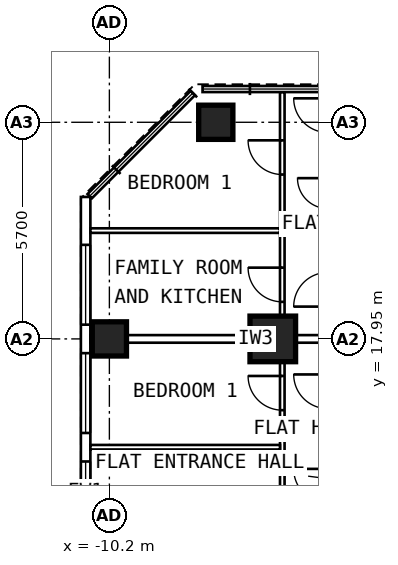
"""IFC4 building model, lengths in metres.
Left out: names, types, materials, properties, quantities, classifications, styles, units other than length and angle.
Written with IfcOpenShell. Run it as: python <this file> out.ifc"""

import sys

from ifc_helpers import new_model, si_unit, direction, frame, frame_2d, origin, origin_2d, place, context, subcontext, project, spatial, rectangle, extrude, element, fill, save


model = new_model("IFC4")
c1 = context("Model", 3, precision=1e-05, world=origin(), true_north=direction((0.0, 1.0)))
c2 = subcontext(c1, "Body", "Model", "MODEL_VIEW")
j1 = project(units=[si_unit("LENGTHUNIT", "METRE"), si_unit("PLANEANGLEUNIT", "RADIAN")], contexts=[c1])
p1 = place(None, origin())
s1 = spatial("IfcSite", under=j1, at=p1, CompositionType="ELEMENT")
p2 = place(p1, origin())
s2 = spatial("IfcBuilding", under=s1, at=p2, CompositionType="ELEMENT")
p3 = place(p2, frame((0.0, 0.0, 141.8)))
s3 = spatial("IfcBuildingStorey", under=s2, at=p3, CompositionType="ELEMENT", Elevation=141.8)
for number, where, z_axis, x_axis in (
    (1, (-10.2, 17.95, 0.0), (0.0, 0.0, 1.0), (0.0, 1.0, 0.0)),
    (2, (-7.4, 23.65, 0.0), (0.0, 0.0, 1.0), (0.0, 1.0, 0.0)),
):
    element("IfcColumn", number, at=place(p3, frame(where, z_axis=z_axis, x_axis=x_axis)), inside=s3, PredefinedType="COLUMN", context=c2, shape_type="SweptSolid", body=[
        extrude(rectangle(XDim=0.9, YDim=0.9, at=origin_2d()), origin(), (0.0, 0.0, 1.0), 3.6),
    ])
p4 = place(p3, frame((-5.9, 17.95, 0.0), z_axis=(0.0, 0.0, 1.0), x_axis=(0.0, 1.0, 0.0)))
e3 = element("IfcColumn", 3, at=p4, inside=s3, PredefinedType="COLUMN", context=c2, shape_type="SweptSolid", body=[
    extrude(rectangle(XDim=1.2, YDim=1.2, at=origin_2d()), origin(), (0.0, 0.0, 1.0), 3.6),
])
p5 = place(p3, frame((-10.825, 6.148, 0.0), z_axis=(0.0, 0.0, 1.0), x_axis=(0.0, 1.0, 0.0)))
e4 = element("IfcWall", 4, at=p5, inside=s3, PredefinedType="SOLIDWALL", context=c2, shape_type="SweptSolid", body=[
    extrude(rectangle(XDim=15.537, YDim=0.25, at=frame_2d((7.769, 0.0))), origin(), (0.0, 0.0, 1.0), 3.35),
])
p6 = place(p5, frame((0.777, 0.0, 0.8)))
e5 = element("IfcOpeningElement", 5, at=p6, cuts=e4, PredefinedType="OPENING", context=c2, shape_type="SweptSolid", body=[
    extrude(rectangle(XDim=2.1, YDim=1.8, at=frame_2d((1.05, 0.9))), frame((0.0, 0.137, 0.0), z_axis=(0.0, -1.0, 0.0), x_axis=(1.0, 0.0, 0.0)), (0.0, 0.0, 1.0), 0.274),
])
p7 = place(p5, frame((3.627, 0.0, 0.8)))
e6 = element("IfcOpeningElement", 6, at=p7, cuts=e4, PredefinedType="OPENING", context=c2, shape_type="SweptSolid", body=[
    extrude(rectangle(XDim=2.1, YDim=1.8, at=frame_2d((1.05, 0.9))), frame((0.0, 0.137, 0.0), z_axis=(0.0, -1.0, 0.0), x_axis=(1.0, 0.0, 0.0)), (0.0, 0.0, 1.0), 0.274),
])
p8 = place(p5, frame((6.477, 0.0, 0.8)))
e7 = element("IfcOpeningElement", 7, at=p8, cuts=e4, PredefinedType="OPENING", context=c2, shape_type="SweptSolid", body=[
    extrude(rectangle(XDim=2.1, YDim=1.8, at=frame_2d((1.05, 0.9))), frame((0.0, 0.137, 0.0), z_axis=(0.0, -1.0, 0.0), x_axis=(1.0, 0.0, 0.0)), (0.0, 0.0, 1.0), 0.274),
])
p9 = place(p5, frame((9.327, 0.0, 0.8)))
e8 = element("IfcOpeningElement", 8, at=p9, cuts=e4, PredefinedType="OPENING", context=c2, shape_type="SweptSolid", body=[
    extrude(rectangle(XDim=2.1, YDim=1.8, at=frame_2d((1.05, 0.9))), frame((0.0, 0.137, 0.0), z_axis=(0.0, -1.0, 0.0), x_axis=(1.0, 0.0, 0.0)), (0.0, 0.0, 1.0), 0.274),
])
p10 = place(p5, frame((12.177, 0.0, 0.8)))
e9 = element("IfcOpeningElement", 9, at=p10, cuts=e4, PredefinedType="OPENING", context=c2, shape_type="SweptSolid", body=[
    extrude(rectangle(XDim=2.1, YDim=1.8, at=frame_2d((1.05, 0.9))), frame((0.0, 0.137, 0.0), z_axis=(0.0, -1.0, 0.0), x_axis=(1.0, 0.0, 0.0)), (0.0, 0.0, 1.0), 0.274),
])
p11 = place(p3, frame((-5.65, 9.6, 0.0), z_axis=(0.0, 0.0, 1.0), x_axis=(0.0, 1.0, 0.0)))
e10 = element("IfcWall", 10, at=p11, inside=s3, PredefinedType="PARTITIONING", context=c2, shape_type="SweptSolid", body=[
    extrude(rectangle(XDim=8.1, YDim=0.12, at=frame_2d((4.05, 0.0))), origin(), (0.0, 0.0, 1.0), 3.35),
])
p12 = place(p11, frame((3.4, 0.0, 0.0)))
e11 = element("IfcOpeningElement", 11, at=p12, cuts=e10, PredefinedType="OPENING", context=c2, shape_type="SweptSolid", body=[
    extrude(rectangle(XDim=0.9, YDim=2.1, at=frame_2d((0.45, 1.05))), frame((0.0, 0.072, 0.0), z_axis=(0.0, -1.0, 0.0), x_axis=(1.0, 0.0, 0.0)), (0.0, 0.0, 1.0), 0.144),
])
p13 = place(p11, frame((6.475, 0.0, 0.0)))
e12 = element("IfcOpeningElement", 12, at=p13, cuts=e10, PredefinedType="OPENING", context=c2, shape_type="SweptSolid", body=[
    extrude(rectangle(XDim=0.9, YDim=2.1, at=frame_2d((0.45, 1.05))), frame((0.0, 0.072, 0.0), z_axis=(0.0, -1.0, 0.0), x_axis=(1.0, 0.0, 0.0)), (0.0, 0.0, 1.0), 0.144),
])
p14 = place(p3, frame((-5.71, 15.1, 0.0), z_axis=(0.0, 0.0, 1.0), x_axis=(-1.0, 0.0, 0.0)))
e13 = element("IfcWall", 13, at=p14, inside=s3, PredefinedType="PARTITIONING", context=c2, shape_type="SweptSolid", body=[
    extrude(rectangle(XDim=4.99, YDim=0.12, at=frame_2d((2.495, 0.0))), origin(), (0.0, 0.0, 1.0), 3.35),
])
p15 = place(p3, frame((-5.65, 18.05, 0.0), z_axis=(0.0, 0.0, 1.0), x_axis=(0.0, 1.0, 0.0)))
e14 = element("IfcWall", 14, at=p15, inside=s3, PredefinedType="PARTITIONING", context=c2, shape_type="SweptSolid", body=[
    extrude(rectangle(XDim=6.395, YDim=0.12, at=frame_2d((3.198, 0.0))), origin(), (0.0, 0.0, 1.0), 3.35),
])
p16 = place(p15, frame((0.875, 0.0, 0.0)))
e15 = element("IfcOpeningElement", 15, at=p16, cuts=e14, PredefinedType="OPENING", context=c2, shape_type="SweptSolid", body=[
    extrude(rectangle(XDim=0.9, YDim=2.1, at=frame_2d((0.45, 1.05))), frame((0.0, 0.072, 0.0), z_axis=(0.0, -1.0, 0.0), x_axis=(1.0, 0.0, 0.0)), (0.0, 0.0, 1.0), 0.144),
])
p17 = place(p15, frame((4.225, 0.0, 0.0)))
e16 = element("IfcOpeningElement", 16, at=p17, cuts=e14, PredefinedType="OPENING", context=c2, shape_type="SweptSolid", body=[
    extrude(rectangle(XDim=0.9, YDim=2.1, at=frame_2d((0.45, 1.05))), frame((0.0, 0.072, 0.0), z_axis=(0.0, -1.0, 0.0), x_axis=(1.0, 0.0, 0.0)), (0.0, 0.0, 1.0), 0.144),
])
p18 = place(p3, frame((-5.71, 20.8, 0.0), z_axis=(0.0, 0.0, 1.0), x_axis=(-1.0, 0.0, 0.0)))
e17 = element("IfcWall", 17, at=p18, inside=s3, PredefinedType="PARTITIONING", context=c2, shape_type="SweptSolid", body=[
    extrude(rectangle(XDim=4.99, YDim=0.12, at=frame_2d((2.495, 0.0))), origin(), (0.0, 0.0, 1.0), 3.35),
])
p19 = place(p3, frame((-2.0, 17.95, 0.0), z_axis=(0.0, 0.0, 1.0), x_axis=(-1.0, 0.0, 0.0)))
e18 = element("IfcWall", 18, at=p19, inside=s3, PredefinedType="PARTITIONING", context=c2, shape_type="SweptSolid", body=[
    extrude(rectangle(XDim=8.7, YDim=0.2, at=frame_2d((4.35, 0.0))), origin(), (0.0, 0.0, 1.0), 2.45),
])
p20 = place(p8, origin())
e19 = element("IfcWindow", 19, at=p20, inside=s3, PartitioningType="SINGLE_PANEL", PredefinedType="WINDOW", context=c2, shape_type="SweptSolid", body=[
    extrude(rectangle(XDim=2.1, YDim=1.8, at=frame_2d((1.05, 0.9))), frame((0.0, 0.03, 0.0), z_axis=(0.0, -1.0, 0.0), x_axis=(1.0, 0.0, 0.0)), (0.0, 0.0, 1.0), 0.06),
])
fill(e7, e19)
p21 = place(p9, origin())
e20 = element("IfcWindow", 20, at=p21, inside=s3, PartitioningType="SINGLE_PANEL", PredefinedType="WINDOW", context=c2, shape_type="SweptSolid", body=[
    extrude(rectangle(XDim=2.1, YDim=1.8, at=frame_2d((1.05, 0.9))), frame((0.0, 0.03, 0.0), z_axis=(0.0, -1.0, 0.0), x_axis=(1.0, 0.0, 0.0)), (0.0, 0.0, 1.0), 0.06),
])
fill(e8, e20)
p22 = place(p10, origin())
e21 = element("IfcWindow", 21, at=p22, inside=s3, PartitioningType="SINGLE_PANEL", PredefinedType="WINDOW", context=c2, shape_type="SweptSolid", body=[
    extrude(rectangle(XDim=2.1, YDim=1.8, at=frame_2d((1.05, 0.9))), frame((0.0, 0.03, 0.0), z_axis=(0.0, -1.0, 0.0), x_axis=(1.0, 0.0, 0.0)), (0.0, 0.0, 1.0), 0.06),
])
fill(e9, e21)
p23 = place(p13, origin())
e22 = element("IfcDoor", 22, at=p23, inside=s3, OperationType="SINGLE_SWING_RIGHT", PredefinedType="DOOR", context=c2, shape_type="SweptSolid", body=[
    extrude(rectangle(XDim=0.9, YDim=2.1, at=frame_2d((0.45, 1.05))), frame((0.0, 0.025, 0.0), z_axis=(0.0, -1.0, 0.0), x_axis=(1.0, 0.0, 0.0)), (0.0, 0.0, 1.0), 0.05),
])
fill(e12, e22)
p24 = place(p16, origin())
e23 = element("IfcDoor", 23, at=p24, inside=s3, OperationType="SINGLE_SWING_RIGHT", PredefinedType="DOOR", context=c2, shape_type="SweptSolid", body=[
    extrude(rectangle(XDim=0.9, YDim=2.1, at=frame_2d((0.45, 1.05))), frame((0.0, 0.025, 0.0), z_axis=(0.0, -1.0, 0.0), x_axis=(1.0, 0.0, 0.0)), (0.0, 0.0, 1.0), 0.05),
])
fill(e15, e23)
p25 = place(p17, origin())
e24 = element("IfcDoor", 24, at=p25, inside=s3, OperationType="SINGLE_SWING_RIGHT", PredefinedType="DOOR", context=c2, shape_type="SweptSolid", body=[
    extrude(rectangle(XDim=0.9, YDim=2.1, at=frame_2d((0.45, 1.05))), frame((0.0, 0.025, 0.0), z_axis=(0.0, -1.0, 0.0), x_axis=(1.0, 0.0, 0.0)), (0.0, 0.0, 1.0), 0.05),
])
fill(e16, e24)
save(model, sys.argv[1])
